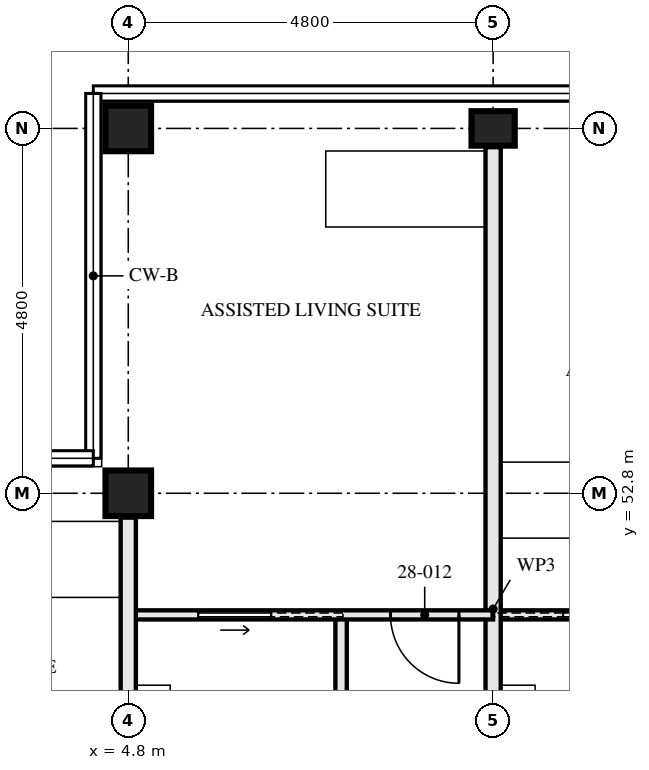
"""IFC4 building model, lengths in metres.
Left out: names, types, materials, properties, quantities, classifications, styles, units other than length and angle.
Written with IfcOpenShell. Run it as: python <this file> out.ifc"""

import sys

from ifc_helpers import new_model, si_unit, direction, frame, frame_2d, origin, origin_2d, place, context, subcontext, project, spatial, rectangle, hollow_rectangle, i_section, extrude, element, fill, save


model = new_model("IFC4")
c1 = context("Model", 3, precision=1e-05, world=origin(), true_north=direction((0.0, 1.0)))
c2 = subcontext(c1, "Body", "Model", "MODEL_VIEW")
j1 = project(units=[si_unit("LENGTHUNIT", "METRE"), si_unit("PLANEANGLEUNIT", "RADIAN")], contexts=[c1])
p1 = place(None, origin())
s1 = spatial("IfcSite", under=j1, at=p1, CompositionType="ELEMENT")
p2 = place(p1, origin())
s2 = spatial("IfcBuilding", under=s1, at=p2, CompositionType="ELEMENT")
p3 = place(p2, frame((0.0, 0.0, 105.0)))
s3 = spatial("IfcBuildingStorey", under=s2, at=p3, CompositionType="ELEMENT", Elevation=105.0)
for number, where, z_axis, x_axis in (
    (1, (4.8, 52.8, 0.0), (0.0, 0.0, 1.0), (0.0, 1.0, 0.0)),
    (2, (4.8, 57.6, 0.0), (0.0, 0.0, 1.0), (0.0, 1.0, 0.0)),
):
    element("IfcColumn", number, at=place(p3, frame(where, z_axis=z_axis, x_axis=x_axis)), inside=s3, PredefinedType="COLUMN", context=c2, shape_type="SweptSolid", body=[
        extrude(hollow_rectangle(XDim=0.6, YDim=0.6, WallThickness=0.05, at=origin_2d()), origin(), (0.0, 0.0, 1.0), 3.5),
    ])
p4 = place(p3, frame((9.6, 57.6, 0.0), z_axis=(0.0, 0.0, 1.0), x_axis=(0.0, 1.0, 0.0)))
e3 = element("IfcColumn", 3, at=p4, inside=s3, PredefinedType="COLUMN", context=c2, shape_type="SweptSolid", body=[
    extrude(i_section(OverallWidth=0.454, OverallDepth=0.569, WebThickness=0.078, FlangeThickness=0.125, FilletRadius=0.015, at=origin_2d()), origin(), (0.0, 0.0, 1.0), 3.5),
])
p5 = place(p3, frame((14.4, 51.2, 0.0), z_axis=(0.0, 0.0, 1.0), x_axis=(-1.0, 0.0, 0.0)))
e4 = element("IfcWall", 4, at=p5, inside=s3, PredefinedType="PARTITIONING", context=c2, shape_type="SweptSolid", body=[
    extrude(rectangle(XDim=4.8, YDim=0.12, at=frame_2d((2.4, 0.0))), origin(), (0.0, 0.0, 1.0), 3.33),
])
p6 = place(p5, frame((0.45, 0.0, 0.0)))
e5 = element("IfcOpeningElement", 5, at=p6, cuts=e4, PredefinedType="OPENING", context=c2, shape_type="SweptSolid", body=[
    extrude(rectangle(XDim=0.9, YDim=2.1, at=frame_2d((0.45, 1.05))), frame((0.0, 0.071, 0.0), z_axis=(0.0, -1.0, 0.0), x_axis=(1.0, 0.0, 0.0)), (0.0, 0.0, 1.0), 0.141),
])
p7 = place(p5, frame((2.925, 0.0, 0.0)))
e6 = element("IfcOpeningElement", 6, at=p7, cuts=e4, PredefinedType="OPENING", context=c2, shape_type="SweptSolid", body=[
    extrude(rectangle(XDim=0.95, YDim=2.1, at=frame_2d((0.475, 1.05))), frame((0.0, 0.071, 0.0), z_axis=(0.0, -1.0, 0.0), x_axis=(1.0, 0.0, 0.0)), (0.0, 0.0, 1.0), 0.141),
])
p8 = place(p3, frame((9.6, 57.353, 0.0), z_axis=(0.0, 0.0, 1.0), x_axis=(0.0, -1.0, 0.0)))
e7 = element("IfcWall", 7, at=p8, inside=s3, PredefinedType="PARTITIONING", context=c2, shape_type="SweptSolid", body=[
    extrude(rectangle(XDim=12.153, YDim=0.2, at=frame_2d((6.077, 0.0))), origin(), (0.0, 0.0, 1.0), 2.55),
])
p9 = place(p3, frame((7.6, 51.2, 0.0), z_axis=(0.0, 0.0, 1.0), x_axis=(0.0, -1.0, 0.0)))
e8 = element("IfcWall", 8, at=p9, inside=s3, PredefinedType="PARTITIONING", context=c2, shape_type="SweptSolid", body=[
    extrude(rectangle(XDim=3.0, YDim=0.15, at=frame_2d((1.5, 0.0))), origin(), (0.0, 0.0, 1.0), 3.33),
])
p10 = place(p3, frame((9.6, 51.2, 0.0), z_axis=(0.0, 0.0, 1.0), x_axis=(-1.0, 0.0, 0.0)))
e9 = element("IfcWall", 9, at=p10, inside=s3, PredefinedType="PARTITIONING", context=c2, shape_type="SweptSolid", body=[
    extrude(rectangle(XDim=4.8, YDim=0.12, at=frame_2d((2.4, 0.0))), origin(), (0.0, 0.0, 1.0), 3.33),
])
p11 = place(p10, frame((0.45, 0.0, 0.0)))
e10 = element("IfcOpeningElement", 10, at=p11, cuts=e9, PredefinedType="OPENING", context=c2, shape_type="SweptSolid", body=[
    extrude(rectangle(XDim=0.9, YDim=2.1, at=frame_2d((0.45, 1.05))), frame((0.0, 0.071, 0.0), z_axis=(0.0, -1.0, 0.0), x_axis=(1.0, 0.0, 0.0)), (0.0, 0.0, 1.0), 0.141),
])
p12 = place(p10, frame((2.925, 0.0, 0.0)))
e11 = element("IfcOpeningElement", 11, at=p12, cuts=e9, PredefinedType="OPENING", context=c2, shape_type="SweptSolid", body=[
    extrude(rectangle(XDim=0.95, YDim=2.1, at=frame_2d((0.475, 1.05))), frame((0.0, 0.071, 0.0), z_axis=(0.0, -1.0, 0.0), x_axis=(1.0, 0.0, 0.0)), (0.0, 0.0, 1.0), 0.141),
])
p13 = place(p3, frame((4.8, 52.48, 0.0), z_axis=(0.0, 0.0, 1.0), x_axis=(0.0, -1.0, 0.0)))
e12 = element("IfcWall", 12, at=p13, inside=s3, PredefinedType="PARTITIONING", context=c2, shape_type="SweptSolid", body=[
    extrude(rectangle(XDim=7.28, YDim=0.2, at=frame_2d((3.64, 0.0))), origin(), (0.0, 0.0, 1.0), 2.55),
])
p14 = place(p7, origin())
e13 = element("IfcDoor", 13, at=p14, inside=s3, OperationType="SLIDING_TO_LEFT", PredefinedType="DOOR", context=c2, shape_type="SweptSolid", body=[
    extrude(rectangle(XDim=0.95, YDim=2.1, at=frame_2d((0.475, 1.05))), frame((0.0, 0.022, 0.0), z_axis=(0.0, -1.0, 0.0), x_axis=(1.0, 0.0, 0.0)), (0.0, 0.0, 1.0), 0.044),
])
fill(e6, e13)
p15 = place(p11, origin())
e14 = element("IfcDoor", 14, at=p15, inside=s3, OperationType="SINGLE_SWING_RIGHT", PredefinedType="DOOR", context=c2, shape_type="SweptSolid", body=[
    extrude(rectangle(XDim=0.9, YDim=2.1, at=frame_2d((0.45, 1.05))), frame((0.0, 0.022, 0.0), z_axis=(0.0, -1.0, 0.0), x_axis=(1.0, 0.0, 0.0)), (0.0, 0.0, 1.0), 0.044),
])
fill(e10, e14)
p16 = place(p12, origin())
e15 = element("IfcDoor", 15, at=p16, inside=s3, OperationType="SLIDING_TO_RIGHT", PredefinedType="DOOR", context=c2, shape_type="SweptSolid", body=[
    extrude(rectangle(XDim=0.95, YDim=2.1, at=frame_2d((0.475, 1.05))), frame((0.0, 0.022, 0.0), z_axis=(0.0, -1.0, 0.0), x_axis=(1.0, 0.0, 0.0)), (0.0, 0.0, 1.0), 0.044),
])
fill(e11, e15)
save(model, sys.argv[1])
